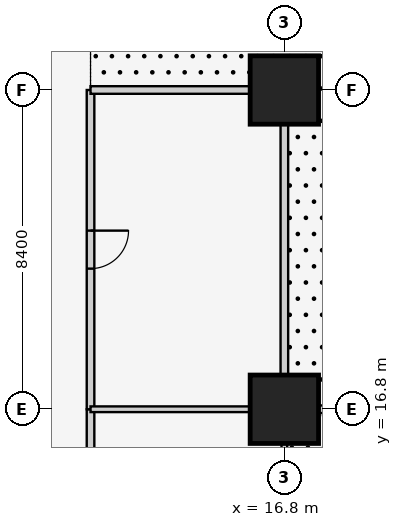
"""IFC4 building model, lengths in metres.
Left out: names, types, materials, properties, quantities, classifications, styles, units other than length and angle.
Written with IfcOpenShell. Run it as: python <this file> out.ifc"""

import sys

from ifc_helpers import new_model, si_unit, direction, frame, frame_2d, origin, origin_2d, place, context, subcontext, project, spatial, rectangle, extrude, element, fill, save


model = new_model("IFC4")
c1 = context("Model", 3, precision=1e-05, world=origin(), true_north=direction((0.0, 1.0)))
c2 = subcontext(c1, "Body", "Model", "MODEL_VIEW")
j1 = project(units=[si_unit("LENGTHUNIT", "METRE"), si_unit("PLANEANGLEUNIT", "RADIAN")], contexts=[c1])
p1 = place(None, origin())
s1 = spatial("IfcSite", under=j1, at=p1, CompositionType="ELEMENT")
p2 = place(p1, origin())
s2 = spatial("IfcBuilding", under=s1, at=p2, CompositionType="ELEMENT")
p3 = place(p2, origin())
s3 = spatial("IfcBuildingStorey", under=s2, at=p3, CompositionType="ELEMENT", Elevation=0.0)
for number, where, z_axis, x_axis in (
    (1, (16.8, 16.8, 0.0), (0.0, 0.0, 1.0), (1.0, 0.0, 0.0)),
    (2, (16.8, 25.2, 0.0), (0.0, 0.0, 1.0), (1.0, 0.0, 0.0)),
):
    element("IfcColumn", number, at=place(p3, frame(where, z_axis=z_axis, x_axis=x_axis)), inside=s3, PredefinedType="COLUMN", context=c2, shape_type="SweptSolid", body=[
        extrude(rectangle(XDim=1.8, YDim=1.8, at=origin_2d()), origin(), (0.0, 0.0, 1.0), 6.0),
    ])
p4 = place(p3, frame((11.7, 16.8, 0.0), z_axis=(0.0, 0.0, 1.0), x_axis=(0.0, -1.0, 0.0)))
e3 = element("IfcWall", 3, at=p4, inside=s3, PredefinedType="PARTITIONING", context=c2, shape_type="SweptSolid", body=[
    extrude(rectangle(XDim=8.4, YDim=0.2, at=frame_2d((4.2, 0.0))), origin(), (0.0, 0.0, 1.0), 5.8),
])
p5 = place(p4, frame((3.7, 0.0, 0.0)))
e4 = element("IfcOpeningElement", 4, at=p5, cuts=e3, PredefinedType="OPENING", context=c2, shape_type="SweptSolid", body=[
    extrude(rectangle(XDim=1.0, YDim=2.1, at=frame_2d((0.5, 1.05))), frame((0.0, 0.11, 0.0), z_axis=(0.0, -1.0, 0.0), x_axis=(1.0, 0.0, 0.0)), (0.0, 0.0, 1.0), 0.22),
])
p6 = place(p3, frame((11.7, 25.2, 0.0), z_axis=(0.0, 0.0, 1.0), x_axis=(0.0, -1.0, 0.0)))
e5 = element("IfcWall", 5, at=p6, inside=s3, PredefinedType="PARTITIONING", context=c2, shape_type="SweptSolid", body=[
    extrude(rectangle(XDim=8.4, YDim=0.2, at=frame_2d((4.2, 0.0))), origin(), (0.0, 0.0, 1.0), 5.8),
])
p7 = place(p6, frame((3.7, 0.0, 0.0)))
e6 = element("IfcOpeningElement", 6, at=p7, cuts=e5, PredefinedType="OPENING", context=c2, shape_type="SweptSolid", body=[
    extrude(rectangle(XDim=1.0, YDim=2.1, at=frame_2d((0.5, 1.05))), frame((0.0, 0.11, 0.0), z_axis=(0.0, -1.0, 0.0), x_axis=(1.0, 0.0, 0.0)), (0.0, 0.0, 1.0), 0.22),
])
p8 = place(p3, frame((24.3, 16.8, 0.0), z_axis=(0.0, 0.0, 1.0), x_axis=(-1.0, 0.0, 0.0)))
e7 = element("IfcWall", 7, at=p8, inside=s3, PredefinedType="PARTITIONING", context=c2, shape_type="SweptSolid", body=[
    extrude(rectangle(XDim=6.6, YDim=0.2, at=frame_2d((3.3, 0.0))), origin(), (0.0, 0.0, 1.0), 5.043),
])
p9 = place(p8, frame((4.5, 0.0, 0.0)))
e8 = element("IfcOpeningElement", 8, at=p9, cuts=e7, PredefinedType="OPENING", context=c2, shape_type="SweptSolid", body=[
    extrude(rectangle(XDim=1.8, YDim=2.4, at=frame_2d((0.9, 1.2))), frame((0.0, 0.11, 0.0), z_axis=(0.0, -1.0, 0.0), x_axis=(1.0, 0.0, 0.0)), (0.0, 0.0, 1.0), 0.22),
])
p10 = place(p3, frame((15.9, 25.2, 0.0), z_axis=(0.0, 0.0, 1.0), x_axis=(-1.0, 0.0, 0.0)))
e9 = element("IfcWall", 9, at=p10, inside=s3, PredefinedType="PARTITIONING", context=c2, shape_type="SweptSolid", body=[
    extrude(rectangle(XDim=4.2, YDim=0.2, at=frame_2d((2.1, 0.0))), origin(), (0.0, 0.0, 1.0), 5.043),
])
p11 = place(p3, frame((16.8, 17.7, 0.0), z_axis=(0.0, 0.0, 1.0), x_axis=(0.0, 1.0, 0.0)))
e10 = element("IfcWall", 10, at=p11, inside=s3, PredefinedType="PARTITIONING", context=c2, shape_type="SweptSolid", body=[
    extrude(rectangle(XDim=6.6, YDim=0.2, at=frame_2d((3.3, 0.0))), origin(), (0.0, 0.0, 1.0), 5.043),
])
p12 = place(p3, frame((16.8, 15.9, 0.0), z_axis=(0.0, 0.0, 1.0), x_axis=(0.0, -1.0, 0.0)))
e11 = element("IfcWall", 11, at=p12, inside=s3, PredefinedType="PARTITIONING", context=c2, shape_type="SweptSolid", body=[
    extrude(rectangle(XDim=6.6, YDim=0.15, at=frame_2d((3.3, 0.0))), origin(), (0.0, 0.0, 1.0), 5.043),
])
p13 = place(p3, frame((11.7, 16.8, 0.0), z_axis=(0.0, 0.0, 1.0), x_axis=(1.0, 0.0, 0.0)))
e12 = element("IfcWall", 12, at=p13, inside=s3, PredefinedType="PARTITIONING", context=c2, shape_type="SweptSolid", body=[
    extrude(rectangle(XDim=4.2, YDim=0.15, at=frame_2d((2.1, 0.0))), origin(), (0.0, 0.0, 1.0), 5.043),
])
p14 = place(p7, origin())
e13 = element("IfcDoor", 13, at=p14, inside=s3, OperationType="SINGLE_SWING_LEFT", PredefinedType="DOOR", context=c2, shape_type="SweptSolid", body=[
    extrude(rectangle(XDim=1.0, YDim=2.1, at=frame_2d((0.5, 1.05))), frame((0.0, 0.025, 0.0), z_axis=(0.0, -1.0, 0.0), x_axis=(1.0, 0.0, 0.0)), (0.0, 0.0, 1.0), 0.05),
])
fill(e6, e13)
save(model, sys.argv[1])
